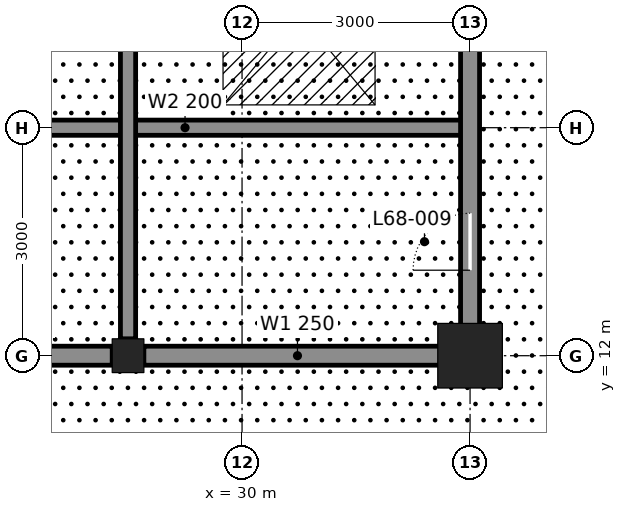
"""IFC4 building model, lengths in metres.
Left out: names, types, materials, properties, quantities, classifications, styles, units other than length and angle.
Written with IfcOpenShell. Run it as: python <this file> out.ifc"""

import sys

from ifc_helpers import new_model, si_unit, direction, frame, frame_2d, origin, origin_2d, place, context, subcontext, project, spatial, rectangle, hollow_rectangle, i_section, extrude, element, fill, save


model = new_model("IFC4")
c1 = context("Model", 3, precision=1e-05, world=origin(), true_north=direction((0.0, 1.0)))
c2 = subcontext(c1, "Body", "Model", "MODEL_VIEW")
j1 = project(units=[si_unit("LENGTHUNIT", "METRE"), si_unit("PLANEANGLEUNIT", "RADIAN")], contexts=[c1])
p1 = place(None, origin())
s1 = spatial("IfcSite", under=j1, at=p1, CompositionType="ELEMENT")
p2 = place(p1, origin())
s2 = spatial("IfcBuilding", under=s1, at=p2, CompositionType="ELEMENT")
p3 = place(p2, frame((0.0, 0.0, 306.0)))
s3 = spatial("IfcBuildingStorey", under=s2, at=p3, CompositionType="ELEMENT", Elevation=306.0)
p4 = place(p3, frame((28.5, 12.0, 0.0), z_axis=(0.0, 0.0, 1.0), x_axis=(1.0, 0.0, 0.0)))
e1 = element("IfcColumn", 1, at=p4, inside=s3, PredefinedType="COLUMN", context=c2, shape_type="SweptSolid", body=[
    extrude(i_section(OverallWidth=0.417, OverallDepth=0.445, WebThickness=0.039, FlangeThickness=0.063, at=origin_2d()), origin(), (0.0, 0.0, 1.0), 6.0),
])
p5 = place(p3, frame((33.0, 12.0, 0.0), z_axis=(0.0, 0.0, 1.0), x_axis=(1.0, 0.0, 0.0)))
e2 = element("IfcColumn", 2, at=p5, inside=s3, PredefinedType="COLUMN", context=c2, shape_type="SweptSolid", body=[
    extrude(hollow_rectangle(XDim=0.85, YDim=0.85, WallThickness=0.085, at=origin_2d()), origin(), (0.0, 0.0, 1.0), 5.8),
])
p6 = place(p3, frame((25.708, 12.0, 0.0), z_axis=(0.0, 0.0, 1.0), x_axis=(1.0, 0.0, 0.0)))
e3 = element("IfcWall", 3, at=p6, inside=s3, PredefinedType="SOLIDWALL", context=c2, shape_type="SweptSolid", body=[
    extrude(rectangle(XDim=2.583, YDim=0.25, at=frame_2d((1.292, 0.0))), origin(), (0.0, 0.0, 1.0), 4.941),
])
p7 = place(p3, frame((28.708, 12.0, 0.0), z_axis=(0.0, 0.0, 1.0), x_axis=(1.0, 0.0, 0.0)))
e4 = element("IfcWall", 4, at=p7, inside=s3, PredefinedType="SOLIDWALL", context=c2, shape_type="SweptSolid", body=[
    extrude(rectangle(XDim=4.042, YDim=0.25, at=frame_2d((2.021, 0.0))), origin(), (0.0, 0.0, 1.0), 4.941),
])
p8 = place(p3, frame((25.5, 15.0, 0.0), z_axis=(0.0, 0.0, 1.0), x_axis=(1.0, 0.0, 0.0)))
e5 = element("IfcWall", 5, at=p8, inside=s3, PredefinedType="SOLIDWALL", context=c2, shape_type="SweptSolid", body=[
    extrude(rectangle(XDim=7.5, YDim=0.2, at=frame_2d((3.75, 0.0))), origin(), (0.0, 0.0, 1.0), 5.8),
])
p9 = place(p3, frame((28.5, 12.222, 0.0), z_axis=(0.0, 0.0, 1.0), x_axis=(0.0, 1.0, 0.0)))
e6 = element("IfcWall", 6, at=p9, inside=s3, PredefinedType="SOLIDWALL", context=c2, shape_type="SweptSolid", body=[
    extrude(rectangle(XDim=8.555, YDim=0.2, at=frame_2d((4.278, 0.0))), origin(), (0.0, 0.0, 1.0), 4.873),
])
p10 = place(p3, frame((33.0, 12.25, 0.0), z_axis=(0.0, 0.0, 1.0), x_axis=(0.0, 1.0, 0.0)))
e7 = element("IfcWall", 7, at=p10, inside=s3, PredefinedType="SOLIDWALL", context=c2, shape_type="SweptSolid", body=[
    extrude(rectangle(XDim=8.528, YDim=0.25, at=frame_2d((4.264, 0.0))), origin(), (0.0, 0.0, 1.0), 4.873),
])
p11 = place(p10, frame((6.65, 0.0, 0.0)))
e8 = element("IfcOpeningElement", 8, at=p11, cuts=e7, PredefinedType="OPENING", context=c2, shape_type="SweptSolid", body=[
    extrude(rectangle(XDim=1.2, YDim=2.1, at=frame_2d((0.6, 1.05))), frame((0.0, 0.135, 0.0), z_axis=(0.0, -1.0, 0.0), x_axis=(1.0, 0.0, 0.0)), (0.0, 0.0, 1.0), 0.27),
])
p12 = place(p10, frame((0.875, 0.0, 0.0)))
e9 = element("IfcOpeningElement", 9, at=p12, cuts=e7, PredefinedType="OPENING", context=c2, shape_type="SweptSolid", body=[
    extrude(rectangle(XDim=0.75, YDim=2.1, at=frame_2d((0.375, 1.05))), frame((0.0, 0.135, 0.0), z_axis=(0.0, -1.0, 0.0), x_axis=(1.0, 0.0, 0.0)), (0.0, 0.0, 1.0), 0.27),
])
p13 = place(p12, origin())
e10 = element("IfcDoor", 10, at=p13, inside=s3, OperationType="SINGLE_SWING_LEFT", PredefinedType="DOOR", context=c2, shape_type="SweptSolid", body=[
    extrude(rectangle(XDim=0.75, YDim=2.1, at=frame_2d((0.375, 1.05))), frame((0.0, 0.025, 0.0), z_axis=(0.0, -1.0, 0.0), x_axis=(1.0, 0.0, 0.0)), (0.0, 0.0, 1.0), 0.05),
])
fill(e9, e10)
save(model, sys.argv[1])
